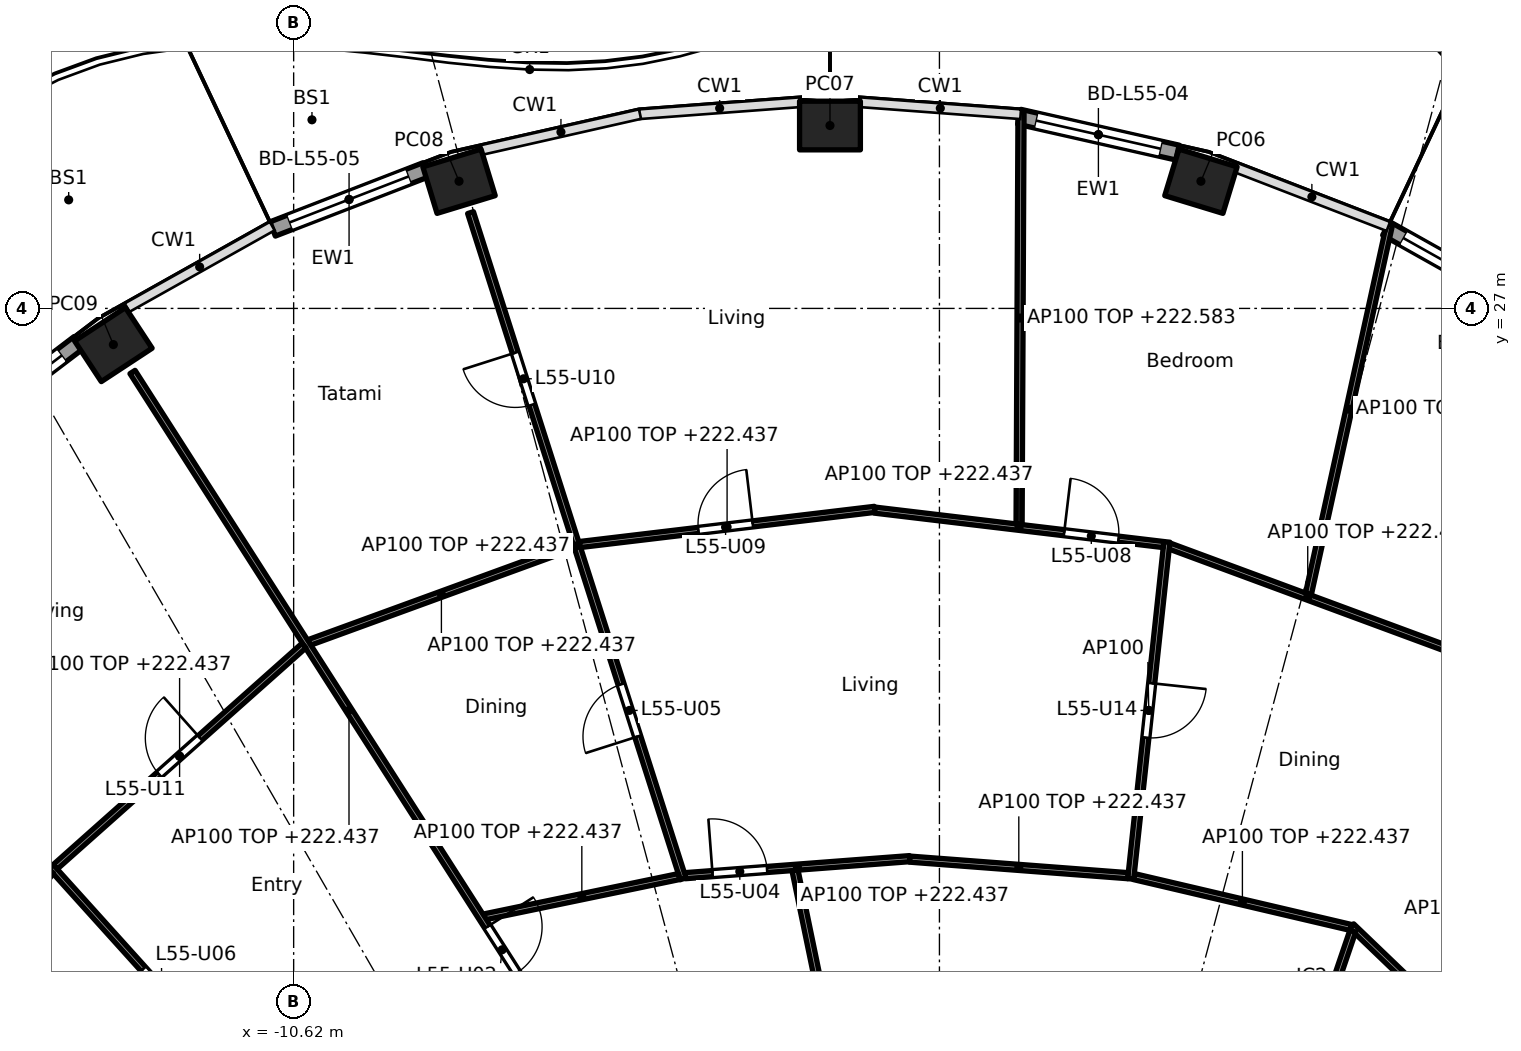
"""IFC4 building model, lengths in metres.
Left out: names, types, materials, properties, quantities, classifications, styles, units other than length and angle.
Written with IfcOpenShell. Run it as: python <this file> out.ifc"""

import sys

from ifc_helpers import new_model, si_unit, direction, frame, frame_2d, origin, origin_2d, place, context, subcontext, project, spatial, rectangle, hollow_rectangle, extrude, element, fill, save


model = new_model("IFC4")
c1 = context("Model", 3, precision=1e-05, world=origin(), true_north=direction((0.0, 1.0)))
c2 = subcontext(c1, "Body", "Model", "MODEL_VIEW")
j1 = project(units=[si_unit("LENGTHUNIT", "METRE"), si_unit("PLANEANGLEUNIT", "RADIAN")], contexts=[c1])
p1 = place(None, origin())
s1 = spatial("IfcSite", under=j1, at=p1, CompositionType="ELEMENT")
p2 = place(p1, origin())
s2 = spatial("IfcBuilding", under=s1, at=p2, CompositionType="ELEMENT")
p3 = place(p2, frame((0.0, 0.0, 219.6)))
s3 = spatial("IfcBuildingStorey", under=s2, at=p3, CompositionType="ELEMENT", Elevation=219.6)
for number, where, z_axis, x_axis in (
    (1, (4.3, 29.092, 0.0), (0.0, 0.0, 1.0), (-0.957, 0.292, 0.0)),
    (2, (-1.8, 30.008, 0.0), (0.0, 0.0, 1.0), (-1.0, 0.0, 0.0)),
    (3, (-7.9, 29.092, 0.0), (0.0, 0.0, 1.0), (-0.957, -0.292, 0.0)),
    (4, (-13.585, 26.405, 0.0), (0.0, 0.0, 1.0), (-0.836, -0.549, 0.0)),
):
    element("IfcColumn", number, at=place(p3, frame(where, z_axis=z_axis, x_axis=x_axis)), inside=s3, PredefinedType="COLUMN", context=c2, shape_type="SweptSolid", body=[
        extrude(hollow_rectangle(XDim=1.0, YDim=0.8, WallThickness=0.032, at=origin_2d()), origin(), (0.0, 0.0, 1.0), 3.7),
    ])
p4 = place(p3, frame((7.35, 28.314, 0.0), z_axis=(0.0, 0.0, 1.0), x_axis=(0.872079929129, -0.489363461254, 0.0)))
e5 = element("IfcWall", 5, at=p4, inside=s3, PredefinedType="SOLIDWALL", context=c2, shape_type="SweptSolid", body=[
    extrude(rectangle(XDim=2.738, YDim=0.25, at=frame_2d((1.369, 0.0))), origin(), (0.0, 0.0, 1.0), 3.44),
])
p5 = place(p4, frame((0.319, 0.0, 0.0)))
e6 = element("IfcOpeningElement", 6, at=p5, cuts=e5, PredefinedType="OPENING", context=c2, shape_type="SweptSolid", body=[
    extrude(rectangle(XDim=2.1, YDim=2.4, at=frame_2d((1.05, 1.2))), frame((0.0, 0.135, 0.0), z_axis=(0.0, -1.0, 0.0), x_axis=(1.0, 0.0, 0.0)), (0.0, 0.0, 1.0), 0.27),
])
p6 = place(p3, frame((1.314, 30.151, 0.0), z_axis=(0.0, 0.0, 1.0), x_axis=(0.975324089124, -0.220777990694, 0.0)))
e7 = element("IfcWall", 7, at=p6, inside=s3, PredefinedType="SOLIDWALL", context=c2, shape_type="SweptSolid", body=[
    extrude(rectangle(XDim=2.666, YDim=0.25, at=frame_2d((1.333, 0.0))), origin(), (0.0, 0.0, 1.0), 3.44),
])
p7 = place(p6, frame((0.283, 0.0, 0.0)))
e8 = element("IfcOpeningElement", 8, at=p7, cuts=e7, PredefinedType="OPENING", context=c2, shape_type="SweptSolid", body=[
    extrude(rectangle(XDim=2.1, YDim=2.4, at=frame_2d((1.05, 1.2))), frame((0.0, 0.135, 0.0), z_axis=(0.0, -1.0, 0.0), x_axis=(1.0, 0.0, 0.0)), (0.0, 0.0, 1.0), 0.27),
])
p8 = place(p3, frame((-10.966, 28.306, 0.0), z_axis=(0.0, 0.0, 1.0), x_axis=(0.932826499224, 0.360325855782, 0.0)))
e9 = element("IfcWall", 9, at=p8, inside=s3, PredefinedType="SOLIDWALL", context=c2, shape_type="SweptSolid", body=[
    extrude(rectangle(XDim=2.696, YDim=0.25, at=frame_2d((1.348, 0.0))), origin(), (0.0, 0.0, 1.0), 3.44),
])
p9 = place(p8, frame((0.298, 0.0, 0.0)))
e10 = element("IfcOpeningElement", 10, at=p9, cuts=e9, PredefinedType="OPENING", context=c2, shape_type="SweptSolid", body=[
    extrude(rectangle(XDim=2.1, YDim=2.4, at=frame_2d((1.05, 1.2))), frame((0.0, 0.135, 0.0), z_axis=(0.0, -1.0, 0.0), x_axis=(1.0, 0.0, 0.0)), (0.0, 0.0, 1.0), 0.27),
])
p10 = place(p3, frame((-16.377, 24.748, 0.0), z_axis=(0.0, 0.0, 1.0), x_axis=(0.795990084031, 0.60530966135, 0.0)))
e11 = element("IfcWall", 11, at=p10, inside=s3, PredefinedType="SOLIDWALL", context=c2, shape_type="SweptSolid", body=[
    extrude(rectangle(XDim=2.789, YDim=0.25, at=frame_2d((1.394, 0.0))), origin(), (0.0, 0.0, 1.0), 3.44),
])
p11 = place(p10, frame((0.344, 0.0, 0.0)))
e12 = element("IfcOpeningElement", 12, at=p11, cuts=e11, PredefinedType="OPENING", context=c2, shape_type="SweptSolid", body=[
    extrude(rectangle(XDim=2.1, YDim=2.4, at=frame_2d((1.05, 1.2))), frame((0.0, 0.135, 0.0), z_axis=(0.0, -1.0, 0.0), x_axis=(1.0, 0.0, 0.0)), (0.0, 0.0, 1.0), 0.27),
])
p12 = place(p3, frame((7.71, 10.197, 0.0), z_axis=(0.0, 0.0, 1.0), x_axis=(0.521477621335, 0.853264959111, 0.0)))
e13 = element("IfcWall", 13, at=p12, inside=s3, PredefinedType="PARTITIONING", context=c2, shape_type="SweptSolid", body=[
    extrude(rectangle(XDim=8.941, YDim=0.1, at=frame_2d((4.471, 0.0))), origin(), (0.0, 0.0, 1.0), 2.762),
])
p13 = place(p12, frame((6.121, 0.0, 0.0)))
e14 = element("IfcOpeningElement", 14, at=p13, cuts=e13, PredefinedType="OPENING", context=c2, shape_type="SweptSolid", body=[
    extrude(rectangle(XDim=0.9, YDim=2.1, at=frame_2d((0.45, 1.05))), frame((0.0, 0.06, 0.0), z_axis=(0.0, -1.0, 0.0), x_axis=(1.0, 0.0, 0.0)), (0.0, 0.0, 1.0), 0.12),
])
p14 = place(p3, frame((9.89, 13.858, 0.0), z_axis=(0.0, 0.0, 1.0), x_axis=(-0.72167233993, 0.692234811159, 0.0)))
e15 = element("IfcWall", 15, at=p14, inside=s3, PredefinedType="PARTITIONING", context=c2, shape_type="SweptSolid", body=[
    extrude(rectangle(XDim=4.313, YDim=0.1, at=frame_2d((2.156, 0.0))), origin(), (0.0, 0.0, 1.0), 2.837),
])
p15 = place(p14, frame((0.883, 0.0, 0.0)))
e16 = element("IfcOpeningElement", 16, at=p15, cuts=e15, PredefinedType="OPENING", context=c2, shape_type="SweptSolid", body=[
    extrude(rectangle(XDim=0.9, YDim=2.1, at=frame_2d((0.45, 1.05))), frame((0.0, 0.06, 0.0), z_axis=(0.0, -1.0, 0.0), x_axis=(1.0, 0.0, 0.0)), (0.0, 0.0, 1.0), 0.12),
])
p16 = place(p3, frame((6.139, 14.829, 0.0), z_axis=(0.0, 0.0, 1.0), x_axis=(0.32278593828, 0.946471995385, 0.0)))
e17 = element("IfcWall", 17, at=p16, inside=s3, PredefinedType="PARTITIONING", context=c2, shape_type="SweptSolid", body=[
    extrude(rectangle(XDim=2.042, YDim=0.1, at=frame_2d((1.021, 0.0))), origin(), (0.0, 0.0, 1.0), 3.44),
])
p17 = place(p3, frame((6.766, 16.82, 0.0), z_axis=(0.0, 0.0, 1.0), x_axis=(-0.973612608559, 0.22820711745, 0.0)))
e18 = element("IfcWall", 18, at=p17, inside=s3, PredefinedType="PARTITIONING", context=c2, shape_type="SweptSolid", body=[
    extrude(rectangle(XDim=3.663, YDim=0.1, at=frame_2d((1.832, 0.0))), origin(), (0.0, 0.0, 1.0), 2.837),
])
p18 = place(p3, frame((8.331, 21.411, 0.0), z_axis=(0.0, 0.0, 1.0), x_axis=(-0.937891982431, 0.346927412136, 0.0)))
e19 = element("IfcWall", 19, at=p18, inside=s3, PredefinedType="PARTITIONING", context=c2, shape_type="SweptSolid", body=[
    extrude(rectangle(XDim=4.85, YDim=0.1, at=frame_2d((2.425, 0.0))), origin(), (0.0, 0.0, 1.0), 2.837),
])
p19 = place(p3, frame((6.067, 22.301, 0.0), z_axis=(0.0, 0.0, 1.0), x_axis=(0.214401821533, 0.976745544614, 0.0)))
e20 = element("IfcWall", 20, at=p19, inside=s3, PredefinedType="PARTITIONING", context=c2, shape_type="SweptSolid", body=[
    extrude(rectangle(XDim=6.228, YDim=0.1, at=frame_2d((3.114, 0.0))), origin(), (0.0, 0.0, 1.0), 2.983),
])
p20 = place(p3, frame((3.145, 17.618, 0.0), z_axis=(0.0, 0.0, 1.0), x_axis=(0.106820754108, 0.994278294288, 0.0)))
e21 = element("IfcWall", 21, at=p20, inside=s3, PredefinedType="PARTITIONING", context=c2, shape_type="SweptSolid", body=[
    extrude(rectangle(XDim=5.574, YDim=0.1, at=frame_2d((2.787, 0.0))), origin(), (0.0, 0.0, 1.0), 3.44),
])
p21 = place(p20, frame((2.337, 0.0, 0.0)))
e22 = element("IfcOpeningElement", 22, at=p21, cuts=e21, PredefinedType="OPENING", context=c2, shape_type="SweptSolid", body=[
    extrude(rectangle(XDim=0.9, YDim=2.1, at=frame_2d((0.45, 1.05))), frame((0.0, 0.06, 0.0), z_axis=(0.0, -1.0, 0.0), x_axis=(1.0, 0.0, 0.0)), (0.0, 0.0, 1.0), 0.12),
])
p22 = place(p3, frame((3.101, 17.671, 0.0), z_axis=(0.0, 0.0, 1.0), x_axis=(-0.997133705575, 0.075659587668, 0.0)))
e23 = element("IfcWall", 23, at=p22, inside=s3, PredefinedType="PARTITIONING", context=c2, shape_type="SweptSolid", body=[
    extrude(rectangle(XDim=3.601, YDim=0.1, at=frame_2d((1.801, 0.0))), origin(), (0.0, 0.0, 1.0), 2.837),
])
p23 = place(p3, frame((3.686, 23.117, 0.0), z_axis=(0.0, 0.0, 1.0), x_axis=(-0.992965872314, 0.11840091393, 0.0)))
e24 = element("IfcWall", 24, at=p23, inside=s3, PredefinedType="PARTITIONING", context=c2, shape_type="SweptSolid", body=[
    extrude(rectangle(XDim=4.786, YDim=0.1, at=frame_2d((2.393, 0.0))), origin(), (0.0, 0.0, 1.0), 2.837),
])
p24 = place(p23, frame((0.746, 0.0, 0.0)))
e25 = element("IfcOpeningElement", 25, at=p24, cuts=e24, PredefinedType="OPENING", context=c2, shape_type="SweptSolid", body=[
    extrude(rectangle(XDim=0.9, YDim=2.1, at=frame_2d((0.45, 1.05))), frame((0.0, 0.06, 0.0), z_axis=(0.0, -1.0, 0.0), x_axis=(1.0, 0.0, 0.0)), (0.0, 0.0, 1.0), 0.12),
])
p25 = place(p3, frame((1.31, 23.45, 0.0), z_axis=(0.0, 0.0, 1.0), x_axis=(0.004678732305, 0.999989054672, 0.0)))
e26 = element("IfcWall", 26, at=p25, inside=s3, PredefinedType="PARTITIONING", context=c2, shape_type="SweptSolid", body=[
    extrude(rectangle(XDim=6.783, YDim=0.1, at=frame_2d((3.392, 0.0))), origin(), (0.0, 0.0, 1.0), 2.983),
])
p26 = place(p3, frame((-0.49, 17.951, 0.0), z_axis=(0.0, 0.0, 1.0), x_axis=(-0.997133495787, -0.075662352452, 0.0)))
e27 = element("IfcWall", 27, at=p26, inside=s3, PredefinedType="PARTITIONING", context=c2, shape_type="SweptSolid", body=[
    extrude(rectangle(XDim=3.701, YDim=0.1, at=frame_2d((1.851, 0.0))), origin(), (0.0, 0.0, 1.0), 2.837),
])
p27 = place(p26, frame((2.351, 0.0, 0.0)))
e28 = element("IfcOpeningElement", 28, at=p27, cuts=e27, PredefinedType="OPENING", context=c2, shape_type="SweptSolid", body=[
    extrude(rectangle(XDim=0.9, YDim=2.1, at=frame_2d((0.45, 1.05))), frame((0.0, 0.06, 0.0), z_axis=(0.0, -1.0, 0.0), x_axis=(1.0, 0.0, 0.0)), (0.0, 0.0, 1.0), 0.12),
])
p28 = place(p3, frame((-1.066, 23.695, 0.0), z_axis=(0.0, 0.0, 1.0), x_axis=(-0.992962413335, -0.118429918957, 0.0)))
e29 = element("IfcWall", 29, at=p28, inside=s3, PredefinedType="PARTITIONING", context=c2, shape_type="SweptSolid", body=[
    extrude(rectangle(XDim=4.886, YDim=0.1, at=frame_2d((2.443, 0.0))), origin(), (0.0, 0.0, 1.0), 2.837),
])
p29 = place(p28, frame((2.018, 0.0, 0.0)))
e30 = element("IfcOpeningElement", 30, at=p29, cuts=e29, PredefinedType="OPENING", context=c2, shape_type="SweptSolid", body=[
    extrude(rectangle(XDim=0.9, YDim=2.1, at=frame_2d((0.45, 1.05))), frame((0.0, 0.06, 0.0), z_axis=(0.0, -1.0, 0.0), x_axis=(1.0, 0.0, 0.0)), (0.0, 0.0, 1.0), 0.12),
])
p30 = place(p3, frame((-1.321, 12.663, 0.0), z_axis=(0.0, 0.0, 1.0), x_axis=(-0.202526486639, 0.979276785291, 0.0)))
e31 = element("IfcWall", 31, at=p30, inside=s3, PredefinedType="PARTITIONING", context=c2, shape_type="SweptSolid", body=[
    extrude(rectangle(XDim=5.204, YDim=0.1, at=frame_2d((2.602, 0.0))), origin(), (0.0, 0.0, 1.0), 2.762),
])
p31 = place(p30, frame((2.152, 0.0, 0.0)))
e32 = element("IfcOpeningElement", 32, at=p31, cuts=e31, PredefinedType="OPENING", context=c2, shape_type="SweptSolid", body=[
    extrude(rectangle(XDim=0.9, YDim=2.1, at=frame_2d((0.45, 1.05))), frame((0.0, 0.06, 0.0), z_axis=(0.0, -1.0, 0.0), x_axis=(1.0, 0.0, 0.0)), (0.0, 0.0, 1.0), 0.12),
])
p32 = place(p3, frame((-4.215, 17.62, 0.0), z_axis=(0.0, 0.0, 1.0), x_axis=(-0.303985237897, 0.952676742206, 0.0)))
e33 = element("IfcWall", 33, at=p32, inside=s3, PredefinedType="PARTITIONING", context=c2, shape_type="SweptSolid", body=[
    extrude(rectangle(XDim=11.499, YDim=0.1, at=frame_2d((5.75, 0.0))), origin(), (0.0, 0.0, 1.0), 2.837),
])
p33 = place(p32, frame((2.457, 0.0, 0.0)))
e34 = element("IfcOpeningElement", 34, at=p33, cuts=e33, PredefinedType="OPENING", context=c2, shape_type="SweptSolid", body=[
    extrude(rectangle(XDim=0.9, YDim=2.1, at=frame_2d((0.45, 1.05))), frame((0.0, 0.06, 0.0), z_axis=(0.0, -1.0, 0.0), x_axis=(1.0, 0.0, 0.0)), (0.0, 0.0, 1.0), 0.12),
])
p34 = place(p32, frame((8.181, 0.0, 0.0)))
e35 = element("IfcOpeningElement", 35, at=p34, cuts=e33, PredefinedType="OPENING", context=c2, shape_type="SweptSolid", body=[
    extrude(rectangle(XDim=0.9, YDim=2.1, at=frame_2d((0.45, 1.05))), frame((0.0, 0.06, 0.0), z_axis=(0.0, -1.0, 0.0), x_axis=(1.0, 0.0, 0.0)), (0.0, 0.0, 1.0), 0.12),
])
p35 = place(p3, frame((-4.28, 17.657, 0.0), z_axis=(0.0, 0.0, 1.0), x_axis=(-0.979205232861, -0.202872156637, 0.0)))
e36 = element("IfcWall", 36, at=p35, inside=s3, PredefinedType="PARTITIONING", context=c2, shape_type="SweptSolid", body=[
    extrude(rectangle(XDim=3.271, YDim=0.1, at=frame_2d((1.635, 0.0))), origin(), (0.0, 0.0, 1.0), 2.837),
])
p36 = place(p3, frame((-6.014, 23.094, 0.0), z_axis=(0.0, 0.0, 1.0), x_axis=(-0.939417400947, -0.342775359089, 0.0)))
e37 = element("IfcWall", 37, at=p36, inside=s3, PredefinedType="PARTITIONING", context=c2, shape_type="SweptSolid", body=[
    extrude(rectangle(XDim=4.633, YDim=0.1, at=frame_2d((2.316, 0.0))), origin(), (0.0, 0.0, 1.0), 2.837),
])
p37 = place(p3, frame((-6.15, 14.824, 0.0), z_axis=(0.0, 0.0, 1.0), x_axis=(-0.538870687577, 0.842388498301, 0.0)))
e38 = element("IfcWall", 38, at=p37, inside=s3, PredefinedType="PARTITIONING", context=c2, shape_type="SweptSolid", body=[
    extrude(rectangle(XDim=13.213, YDim=0.1, at=frame_2d((6.606, 0.0))), origin(), (0.0, 0.0, 1.0), 2.837),
])
p38 = place(p37, frame((1.483, 0.0, 0.0)))
e39 = element("IfcOpeningElement", 39, at=p38, cuts=e38, PredefinedType="OPENING", context=c2, shape_type="SweptSolid", body=[
    extrude(rectangle(XDim=0.9, YDim=2.1, at=frame_2d((0.45, 1.05))), frame((0.0, 0.06, 0.0), z_axis=(0.0, -1.0, 0.0), x_axis=(1.0, 0.0, 0.0)), (0.0, 0.0, 1.0), 0.12),
])
p39 = place(p3, frame((-10.45, 21.455, 0.0), z_axis=(0.0, 0.0, 1.0), x_axis=(-0.747150931973, -0.66465441009, 0.0)))
e40 = element("IfcWall", 40, at=p39, inside=s3, PredefinedType="PARTITIONING", context=c2, shape_type="SweptSolid", body=[
    extrude(rectangle(XDim=5.475, YDim=0.1, at=frame_2d((2.737, 0.0))), origin(), (0.0, 0.0, 1.0), 2.837),
])
p40 = place(p39, frame((2.288, 0.0, 0.0)))
e41 = element("IfcOpeningElement", 41, at=p40, cuts=e40, PredefinedType="OPENING", context=c2, shape_type="SweptSolid", body=[
    extrude(rectangle(XDim=0.9, YDim=2.1, at=frame_2d((0.45, 1.05))), frame((0.0, 0.06, 0.0), z_axis=(0.0, -1.0, 0.0), x_axis=(1.0, 0.0, 0.0)), (0.0, 0.0, 1.0), 0.12),
])
p41 = place(p3, frame((-7.725, 10.186, 0.0), z_axis=(0.0, 0.0, 1.0), x_axis=(-0.669819599194, 0.742523874725, 0.0)))
e42 = element("IfcWall", 42, at=p41, inside=s3, PredefinedType="PARTITIONING", context=c2, shape_type="SweptSolid", body=[
    extrude(rectangle(XDim=10.282, YDim=0.1, at=frame_2d((5.141, 0.0))), origin(), (0.0, 0.0, 1.0), 2.762),
])
p42 = place(p41, frame((2.0, 0.0, 0.0)))
e43 = element("IfcOpeningElement", 43, at=p42, cuts=e42, PredefinedType="OPENING", context=c2, shape_type="SweptSolid", body=[
    extrude(rectangle(XDim=0.9, YDim=2.1, at=frame_2d((0.45, 1.05))), frame((0.0, 0.06, 0.0), z_axis=(0.0, -1.0, 0.0), x_axis=(1.0, 0.0, 0.0)), (0.0, 0.0, 1.0), 0.12),
])
p43 = place(p41, frame((7.116, 0.0, 0.0)))
e44 = element("IfcOpeningElement", 44, at=p43, cuts=e42, PredefinedType="OPENING", context=c2, shape_type="SweptSolid", body=[
    extrude(rectangle(XDim=0.9, YDim=2.1, at=frame_2d((0.45, 1.05))), frame((0.0, 0.06, 0.0), z_axis=(0.0, -1.0, 0.0), x_axis=(1.0, 0.0, 0.0)), (0.0, 0.0, 1.0), 0.12),
])
p44 = place(p3, frame((-14.608, 17.743, 0.0), z_axis=(0.0, 0.0, 1.0), x_axis=(-0.596174489482, -0.8028548923, 0.0)))
e45 = element("IfcWall", 45, at=p44, inside=s3, PredefinedType="PARTITIONING", context=c2, shape_type="SweptSolid", body=[
    extrude(rectangle(XDim=5.442, YDim=0.1, at=frame_2d((2.721, 0.0))), origin(), (0.0, 0.0, 1.0), 2.837),
])
p45 = place(p5, origin())
e46 = element("IfcDoor", 46, at=p45, inside=s3, OperationType="SLIDING_TO_LEFT", PredefinedType="DOOR", context=c2, shape_type="SweptSolid", body=[
    extrude(rectangle(XDim=2.1, YDim=2.4, at=frame_2d((1.05, 1.2))), frame((0.0, 0.025, 0.0), z_axis=(0.0, -1.0, 0.0), x_axis=(1.0, 0.0, 0.0)), (0.0, 0.0, 1.0), 0.05),
])
fill(e6, e46)
p46 = place(p7, origin())
e47 = element("IfcDoor", 47, at=p46, inside=s3, OperationType="SLIDING_TO_LEFT", PredefinedType="DOOR", context=c2, shape_type="SweptSolid", body=[
    extrude(rectangle(XDim=2.1, YDim=2.4, at=frame_2d((1.05, 1.2))), frame((0.0, 0.025, 0.0), z_axis=(0.0, -1.0, 0.0), x_axis=(1.0, 0.0, 0.0)), (0.0, 0.0, 1.0), 0.05),
])
fill(e8, e47)
p47 = place(p9, origin())
e48 = element("IfcDoor", 48, at=p47, inside=s3, OperationType="SLIDING_TO_LEFT", PredefinedType="DOOR", context=c2, shape_type="SweptSolid", body=[
    extrude(rectangle(XDim=2.1, YDim=2.4, at=frame_2d((1.05, 1.2))), frame((0.0, 0.025, 0.0), z_axis=(0.0, -1.0, 0.0), x_axis=(1.0, 0.0, 0.0)), (0.0, 0.0, 1.0), 0.05),
])
fill(e10, e48)
p48 = place(p11, origin())
e49 = element("IfcDoor", 49, at=p48, inside=s3, OperationType="SLIDING_TO_LEFT", PredefinedType="DOOR", context=c2, shape_type="SweptSolid", body=[
    extrude(rectangle(XDim=2.1, YDim=2.4, at=frame_2d((1.05, 1.2))), frame((0.0, 0.025, 0.0), z_axis=(0.0, -1.0, 0.0), x_axis=(1.0, 0.0, 0.0)), (0.0, 0.0, 1.0), 0.05),
])
fill(e12, e49)
p49 = place(p38, frame((0.9, 0.0, 0.0), x_axis=(-1.0, 0.0, 0.0)))
e50 = element("IfcDoor", 50, at=p49, inside=s3, OperationType="SINGLE_SWING_LEFT", PredefinedType="DOOR", context=c2, shape_type="SweptSolid", body=[
    extrude(rectangle(XDim=0.9, YDim=2.1, at=frame_2d((0.45, 1.05))), frame((0.0, 0.025, 0.0), z_axis=(0.0, -1.0, 0.0), x_axis=(1.0, 0.0, 0.0)), (0.0, 0.0, 1.0), 0.05),
])
fill(e39, e50)
p50 = place(p27, frame((0.9, 0.0, 0.0), x_axis=(-1.0, 0.0, 0.0)))
e51 = element("IfcDoor", 51, at=p50, inside=s3, OperationType="SINGLE_SWING_LEFT", PredefinedType="DOOR", context=c2, shape_type="SweptSolid", body=[
    extrude(rectangle(XDim=0.9, YDim=2.1, at=frame_2d((0.45, 1.05))), frame((0.0, 0.025, 0.0), z_axis=(0.0, -1.0, 0.0), x_axis=(1.0, 0.0, 0.0)), (0.0, 0.0, 1.0), 0.05),
])
fill(e28, e51)
p51 = place(p33, origin())
e52 = element("IfcDoor", 52, at=p51, inside=s3, OperationType="SINGLE_SWING_LEFT", PredefinedType="DOOR", context=c2, shape_type="SweptSolid", body=[
    extrude(rectangle(XDim=0.9, YDim=2.1, at=frame_2d((0.45, 1.05))), frame((0.0, 0.025, 0.0), z_axis=(0.0, -1.0, 0.0), x_axis=(1.0, 0.0, 0.0)), (0.0, 0.0, 1.0), 0.05),
])
fill(e34, e52)
p52 = place(p43, origin())
e53 = element("IfcDoor", 53, at=p52, inside=s3, OperationType="SINGLE_SWING_RIGHT", PredefinedType="DOOR", context=c2, shape_type="SweptSolid", body=[
    extrude(rectangle(XDim=0.9, YDim=2.1, at=frame_2d((0.45, 1.05))), frame((0.0, 0.025, 0.0), z_axis=(0.0, -1.0, 0.0), x_axis=(1.0, 0.0, 0.0)), (0.0, 0.0, 1.0), 0.05),
])
fill(e44, e53)
p53 = place(p24, frame((0.9, 0.0, 0.0), x_axis=(-1.0, 0.0, 0.0)))
e54 = element("IfcDoor", 54, at=p53, inside=s3, OperationType="SINGLE_SWING_LEFT", PredefinedType="DOOR", context=c2, shape_type="SweptSolid", body=[
    extrude(rectangle(XDim=0.9, YDim=2.1, at=frame_2d((0.45, 1.05))), frame((0.0, 0.025, 0.0), z_axis=(0.0, -1.0, 0.0), x_axis=(1.0, 0.0, 0.0)), (0.0, 0.0, 1.0), 0.05),
])
fill(e25, e54)
p54 = place(p29, frame((0.9, 0.0, 0.0), x_axis=(-1.0, 0.0, 0.0)))
e55 = element("IfcDoor", 55, at=p54, inside=s3, OperationType="SINGLE_SWING_RIGHT", PredefinedType="DOOR", context=c2, shape_type="SweptSolid", body=[
    extrude(rectangle(XDim=0.9, YDim=2.1, at=frame_2d((0.45, 1.05))), frame((0.0, 0.025, 0.0), z_axis=(0.0, -1.0, 0.0), x_axis=(1.0, 0.0, 0.0)), (0.0, 0.0, 1.0), 0.05),
])
fill(e30, e55)
p55 = place(p34, origin())
e56 = element("IfcDoor", 56, at=p55, inside=s3, OperationType="SINGLE_SWING_RIGHT", PredefinedType="DOOR", context=c2, shape_type="SweptSolid", body=[
    extrude(rectangle(XDim=0.9, YDim=2.1, at=frame_2d((0.45, 1.05))), frame((0.0, 0.025, 0.0), z_axis=(0.0, -1.0, 0.0), x_axis=(1.0, 0.0, 0.0)), (0.0, 0.0, 1.0), 0.05),
])
fill(e35, e56)
p56 = place(p40, frame((0.9, 0.0, 0.0), x_axis=(-1.0, 0.0, 0.0)))
e57 = element("IfcDoor", 57, at=p56, inside=s3, OperationType="SINGLE_SWING_RIGHT", PredefinedType="DOOR", context=c2, shape_type="SweptSolid", body=[
    extrude(rectangle(XDim=0.9, YDim=2.1, at=frame_2d((0.45, 1.05))), frame((0.0, 0.025, 0.0), z_axis=(0.0, -1.0, 0.0), x_axis=(1.0, 0.0, 0.0)), (0.0, 0.0, 1.0), 0.05),
])
fill(e41, e57)
p57 = place(p21, frame((0.9, 0.0, 0.0), x_axis=(-1.0, 0.0, 0.0)))
e58 = element("IfcDoor", 58, at=p57, inside=s3, OperationType="SINGLE_SWING_LEFT", PredefinedType="DOOR", context=c2, shape_type="SweptSolid", body=[
    extrude(rectangle(XDim=0.9, YDim=2.1, at=frame_2d((0.45, 1.05))), frame((0.0, 0.025, 0.0), z_axis=(0.0, -1.0, 0.0), x_axis=(1.0, 0.0, 0.0)), (0.0, 0.0, 1.0), 0.05),
])
fill(e22, e58)
save(model, sys.argv[1])
